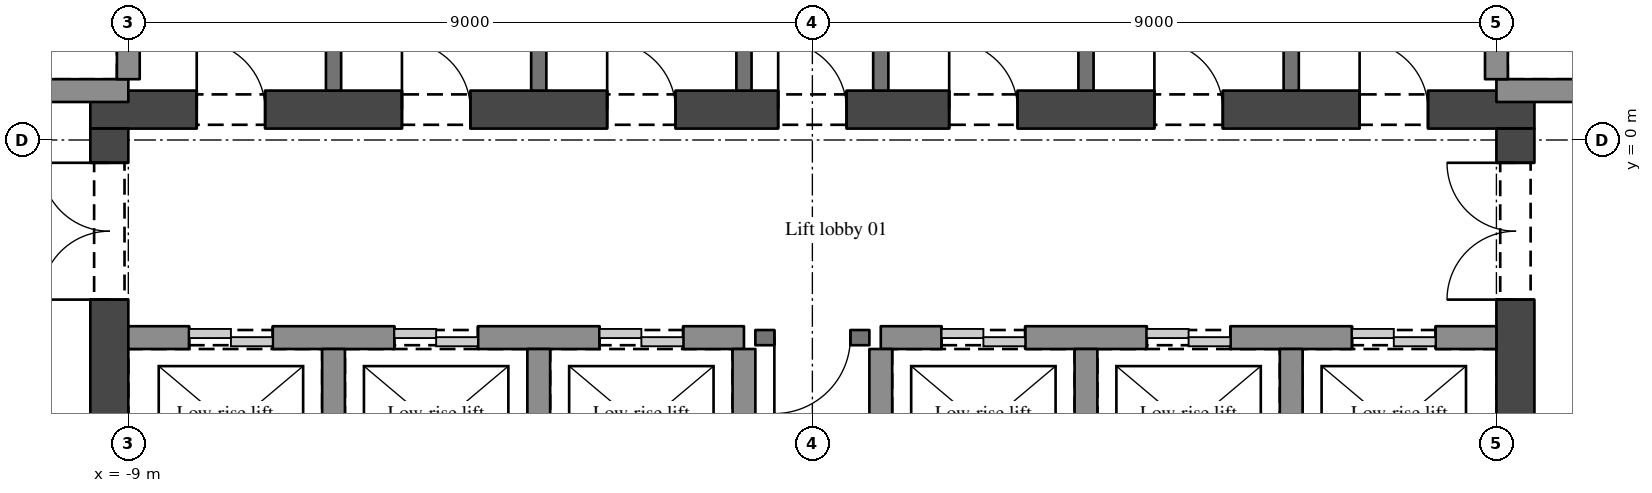
"""IFC4 building model, lengths in metres.
Left out: names, types, materials, properties, quantities, classifications, styles, units other than length and angle.
Written with IfcOpenShell. Run it as: python <this file> out.ifc"""

import sys

from ifc_helpers import new_model, si_unit, direction, frame, frame_2d, origin, place, context, subcontext, project, spatial, rectangle, extrude, element, fill, save


model = new_model("IFC4")
c1 = context("Model", 3, precision=1e-05, world=origin(), true_north=direction((0.0, 1.0)))
c2 = subcontext(c1, "Body", "Model", "MODEL_VIEW")
j1 = project(units=[si_unit("LENGTHUNIT", "METRE"), si_unit("PLANEANGLEUNIT", "RADIAN")], contexts=[c1])
p1 = place(None, origin())
s1 = spatial("IfcSite", under=j1, at=p1, CompositionType="ELEMENT")
p2 = place(p1, origin())
s2 = spatial("IfcBuilding", under=s1, at=p2, CompositionType="ELEMENT")
p3 = place(p2, frame((0.0, 0.0, 62.1)))
s3 = spatial("IfcBuildingStorey", under=s2, at=p3, CompositionType="ELEMENT", Elevation=62.1)
p4 = place(p3, frame((-9.5, 0.4, 0.0), z_axis=(0.0, 0.0, 1.0), x_axis=(1.0, 0.0, 0.0)))
e1 = element("IfcWall", 1, at=p4, inside=s3, PredefinedType="SHEAR", context=c2, shape_type="SweptSolid", body=[
    extrude(rectangle(XDim=19.0, YDim=0.5, at=frame_2d((9.5, 0.0))), origin(), (0.0, 0.0, 1.0), 3.9),
])
p5 = place(p4, frame((1.4, 0.0, 0.0)))
e2 = element("IfcOpeningElement", 2, at=p5, cuts=e1, PredefinedType="OPENING", context=c2, shape_type="SweptSolid", body=[
    extrude(rectangle(XDim=0.9, YDim=2.1, at=frame_2d((0.45, 1.05))), frame((0.0, 0.26, 0.0), z_axis=(0.0, -1.0, 0.0), x_axis=(1.0, 0.0, 0.0)), (0.0, 0.0, 1.0), 0.52),
])
p6 = place(p4, frame((4.1, 0.0, 0.0)))
e3 = element("IfcOpeningElement", 3, at=p6, cuts=e1, PredefinedType="OPENING", context=c2, shape_type="SweptSolid", body=[
    extrude(rectangle(XDim=0.9, YDim=2.1, at=frame_2d((0.45, 1.05))), frame((0.0, 0.26, 0.0), z_axis=(0.0, -1.0, 0.0), x_axis=(1.0, 0.0, 0.0)), (0.0, 0.0, 1.0), 0.52),
])
p7 = place(p4, frame((6.8, 0.0, 0.0)))
e4 = element("IfcOpeningElement", 4, at=p7, cuts=e1, PredefinedType="OPENING", context=c2, shape_type="SweptSolid", body=[
    extrude(rectangle(XDim=0.9, YDim=2.1, at=frame_2d((0.45, 1.05))), frame((0.0, 0.26, 0.0), z_axis=(0.0, -1.0, 0.0), x_axis=(1.0, 0.0, 0.0)), (0.0, 0.0, 1.0), 0.52),
])
p8 = place(p4, frame((11.3, 0.0, 0.0)))
e5 = element("IfcOpeningElement", 5, at=p8, cuts=e1, PredefinedType="OPENING", context=c2, shape_type="SweptSolid", body=[
    extrude(rectangle(XDim=0.9, YDim=2.1, at=frame_2d((0.45, 1.05))), frame((0.0, 0.26, 0.0), z_axis=(0.0, -1.0, 0.0), x_axis=(1.0, 0.0, 0.0)), (0.0, 0.0, 1.0), 0.52),
])
p9 = place(p4, frame((14.0, 0.0, 0.0)))
e6 = element("IfcOpeningElement", 6, at=p9, cuts=e1, PredefinedType="OPENING", context=c2, shape_type="SweptSolid", body=[
    extrude(rectangle(XDim=0.9, YDim=2.1, at=frame_2d((0.45, 1.05))), frame((0.0, 0.26, 0.0), z_axis=(0.0, -1.0, 0.0), x_axis=(1.0, 0.0, 0.0)), (0.0, 0.0, 1.0), 0.52),
])
p10 = place(p4, frame((16.7, 0.0, 0.0)))
e7 = element("IfcOpeningElement", 7, at=p10, cuts=e1, PredefinedType="OPENING", context=c2, shape_type="SweptSolid", body=[
    extrude(rectangle(XDim=0.9, YDim=2.1, at=frame_2d((0.45, 1.05))), frame((0.0, 0.26, 0.0), z_axis=(0.0, -1.0, 0.0), x_axis=(1.0, 0.0, 0.0)), (0.0, 0.0, 1.0), 0.52),
])
p11 = place(p4, frame((9.05, 0.0, 0.0)))
e8 = element("IfcOpeningElement", 8, at=p11, cuts=e1, PredefinedType="OPENING", context=c2, shape_type="SweptSolid", body=[
    extrude(rectangle(XDim=0.9, YDim=2.1, at=frame_2d((0.45, 1.05))), frame((0.0, 0.26, 0.0), z_axis=(0.0, -1.0, 0.0), x_axis=(1.0, 0.0, 0.0)), (0.0, 0.0, 1.0), 0.52),
])
p12 = place(p3, frame((-9.25, -11.5, 0.0), z_axis=(0.0, 0.0, 1.0), x_axis=(0.0, 1.0, 0.0)))
e9 = element("IfcWall", 9, at=p12, inside=s3, PredefinedType="SHEAR", context=c2, shape_type="SweptSolid", body=[
    extrude(rectangle(XDim=11.65, YDim=0.5, at=frame_2d((5.825, 0.0))), origin(), (0.0, 0.0, 1.0), 3.9),
])
p13 = place(p12, frame((9.4, 0.0, 0.0)))
e10 = element("IfcOpeningElement", 10, at=p13, cuts=e9, PredefinedType="OPENING", context=c2, shape_type="SweptSolid", body=[
    extrude(rectangle(XDim=1.8, YDim=2.1, at=frame_2d((0.9, 1.05))), frame((0.0, 0.26, 0.0), z_axis=(0.0, -1.0, 0.0), x_axis=(1.0, 0.0, 0.0)), (0.0, 0.0, 1.0), 0.52),
])
p14 = place(p12, frame((5.25, 0.0, 0.0)))
e11 = element("IfcOpeningElement", 11, at=p14, cuts=e9, PredefinedType="OPENING", context=c2, shape_type="SweptSolid", body=[
    extrude(rectangle(XDim=1.1, YDim=2.1, at=frame_2d((0.55, 1.05))), frame((0.0, 0.26, 0.0), z_axis=(0.0, -1.0, 0.0), x_axis=(1.0, 0.0, 0.0)), (0.0, 0.0, 1.0), 0.52),
])
p15 = place(p3, frame((9.25, -11.5, 0.0), z_axis=(0.0, 0.0, 1.0), x_axis=(0.0, 1.0, 0.0)))
e12 = element("IfcWall", 12, at=p15, inside=s3, PredefinedType="SHEAR", context=c2, shape_type="SweptSolid", body=[
    extrude(rectangle(XDim=11.65, YDim=0.5, at=frame_2d((5.825, 0.0))), origin(), (0.0, 0.0, 1.0), 3.9),
])
p16 = place(p15, frame((9.4, 0.0, 0.0)))
e13 = element("IfcOpeningElement", 13, at=p16, cuts=e12, PredefinedType="OPENING", context=c2, shape_type="SweptSolid", body=[
    extrude(rectangle(XDim=1.8, YDim=2.1, at=frame_2d((0.9, 1.05))), frame((0.0, 0.26, 0.0), z_axis=(0.0, -1.0, 0.0), x_axis=(1.0, 0.0, 0.0)), (0.0, 0.0, 1.0), 0.52),
])
p17 = place(p15, frame((5.25, 0.0, 0.0)))
e14 = element("IfcOpeningElement", 14, at=p17, cuts=e12, PredefinedType="OPENING", context=c2, shape_type="SweptSolid", body=[
    extrude(rectangle(XDim=1.1, YDim=2.1, at=frame_2d((0.55, 1.05))), frame((0.0, 0.26, 0.0), z_axis=(0.0, -1.0, 0.0), x_axis=(1.0, 0.0, 0.0)), (0.0, 0.0, 1.0), 0.52),
])
p18 = place(p3, frame((-9.0, -2.6, 0.0), z_axis=(0.0, 0.0, 1.0), x_axis=(1.0, 0.0, 0.0)))
e15 = element("IfcWall", 15, at=p18, inside=s3, PredefinedType="SHEAR", context=c2, shape_type="SweptSolid", body=[
    extrude(rectangle(XDim=8.1, YDim=0.3, at=frame_2d((4.05, 0.0))), origin(), (0.0, 0.0, 1.0), 3.9),
])
p19 = place(p18, frame((0.8, 0.0, 0.0)))
e16 = element("IfcOpeningElement", 16, at=p19, cuts=e15, PredefinedType="OPENING", context=c2, shape_type="SweptSolid", body=[
    extrude(rectangle(XDim=1.1, YDim=2.1, at=frame_2d((0.55, 1.05))), frame((0.0, 0.16, 0.0), z_axis=(0.0, -1.0, 0.0), x_axis=(1.0, 0.0, 0.0)), (0.0, 0.0, 1.0), 0.32),
])
p20 = place(p18, frame((3.5, 0.0, 0.0)))
e17 = element("IfcOpeningElement", 17, at=p20, cuts=e15, PredefinedType="OPENING", context=c2, shape_type="SweptSolid", body=[
    extrude(rectangle(XDim=1.1, YDim=2.1, at=frame_2d((0.55, 1.05))), frame((0.0, 0.16, 0.0), z_axis=(0.0, -1.0, 0.0), x_axis=(1.0, 0.0, 0.0)), (0.0, 0.0, 1.0), 0.32),
])
p21 = place(p18, frame((6.2, 0.0, 0.0)))
e18 = element("IfcOpeningElement", 18, at=p21, cuts=e15, PredefinedType="OPENING", context=c2, shape_type="SweptSolid", body=[
    extrude(rectangle(XDim=1.1, YDim=2.1, at=frame_2d((0.55, 1.05))), frame((0.0, 0.16, 0.0), z_axis=(0.0, -1.0, 0.0), x_axis=(1.0, 0.0, 0.0)), (0.0, 0.0, 1.0), 0.32),
])
p22 = place(p3, frame((0.75, -2.6, 0.0), z_axis=(0.0, 0.0, 1.0), x_axis=(-1.0, 0.0, 0.0)))
e19 = element("IfcWall", 19, at=p22, inside=s3, PredefinedType="SOLIDWALL", context=c2, shape_type="SweptSolid", body=[
    extrude(rectangle(XDim=1.5, YDim=0.2, at=frame_2d((0.75, 0.0))), origin(), (0.0, 0.0, 1.0), 3.6),
])
p23 = place(p22, frame((0.25, 0.0, 0.0)))
e20 = element("IfcOpeningElement", 20, at=p23, cuts=e19, PredefinedType="OPENING", context=c2, shape_type="SweptSolid", body=[
    extrude(rectangle(XDim=1.0, YDim=2.1, at=frame_2d((0.5, 1.05))), frame((0.0, 0.11, 0.0), z_axis=(0.0, -1.0, 0.0), x_axis=(1.0, 0.0, 0.0)), (0.0, 0.0, 1.0), 0.22),
])
p24 = place(p3, frame((0.9, -2.6, 0.0), z_axis=(0.0, 0.0, 1.0), x_axis=(1.0, 0.0, 0.0)))
e21 = element("IfcWall", 21, at=p24, inside=s3, PredefinedType="SHEAR", context=c2, shape_type="SweptSolid", body=[
    extrude(rectangle(XDim=8.1, YDim=0.3, at=frame_2d((4.05, 0.0))), origin(), (0.0, 0.0, 1.0), 3.9),
])
p25 = place(p24, frame((0.8, 0.0, 0.0)))
e22 = element("IfcOpeningElement", 22, at=p25, cuts=e21, PredefinedType="OPENING", context=c2, shape_type="SweptSolid", body=[
    extrude(rectangle(XDim=1.1, YDim=2.1, at=frame_2d((0.55, 1.05))), frame((0.0, 0.16, 0.0), z_axis=(0.0, -1.0, 0.0), x_axis=(1.0, 0.0, 0.0)), (0.0, 0.0, 1.0), 0.32),
])
p26 = place(p24, frame((3.5, 0.0, 0.0)))
e23 = element("IfcOpeningElement", 23, at=p26, cuts=e21, PredefinedType="OPENING", context=c2, shape_type="SweptSolid", body=[
    extrude(rectangle(XDim=1.1, YDim=2.1, at=frame_2d((0.55, 1.05))), frame((0.0, 0.16, 0.0), z_axis=(0.0, -1.0, 0.0), x_axis=(1.0, 0.0, 0.0)), (0.0, 0.0, 1.0), 0.32),
])
p27 = place(p24, frame((6.2, 0.0, 0.0)))
e24 = element("IfcOpeningElement", 24, at=p27, cuts=e21, PredefinedType="OPENING", context=c2, shape_type="SweptSolid", body=[
    extrude(rectangle(XDim=1.1, YDim=2.1, at=frame_2d((0.55, 1.05))), frame((0.0, 0.16, 0.0), z_axis=(0.0, -1.0, 0.0), x_axis=(1.0, 0.0, 0.0)), (0.0, 0.0, 1.0), 0.32),
])
for number, where, z_axis, x_axis in (
    (25, (-9.0, 0.65, 0.0), (0.0, 0.0, 1.0), (-1.0, 0.0, 0.0)),
    (26, (12.25, 0.65, 0.0), (0.0, 0.0, 1.0), (-1.0, 0.0, 0.0)),
):
    element("IfcWall", number, at=place(p3, frame(where, z_axis=z_axis, x_axis=x_axis)), inside=s3, PredefinedType="SHEAR", context=c2, shape_type="SweptSolid", body=[
        extrude(rectangle(XDim=3.25, YDim=0.3, at=frame_2d((1.625, 0.0))), origin(), (0.0, 0.0, 1.0), 3.9),
    ])
p28 = place(p3, frame((-9.0, 0.8, 0.0), z_axis=(0.0, 0.0, 1.0), x_axis=(0.0, 1.0, 0.0)))
e27 = element("IfcWall", 27, at=p28, inside=s3, PredefinedType="SHEAR", context=c2, shape_type="SweptSolid", body=[
    extrude(rectangle(XDim=2.35, YDim=0.3, at=frame_2d((1.175, 0.0))), origin(), (0.0, 0.0, 1.0), 3.9),
])
p29 = place(p3, frame((-6.3, -4.8, 0.0), z_axis=(0.0, 0.0, 1.0), x_axis=(0.0, 1.0, 0.0)))
e28 = element("IfcWall", 28, at=p29, inside=s3, PredefinedType="SHEAR", context=c2, shape_type="SweptSolid", body=[
    extrude(rectangle(XDim=2.05, YDim=0.3, at=frame_2d((1.025, 0.0))), origin(), (0.0, 0.0, 1.0), 3.9),
])
p30 = place(p3, frame((-6.3, 0.65, 0.0), z_axis=(0.0, 0.0, 1.0), x_axis=(0.0, 1.0, 0.0)))
e29 = element("IfcWall", 29, at=p30, inside=s3, PredefinedType="SOLIDWALL", context=c2, shape_type="SweptSolid", body=[
    extrude(rectangle(XDim=2.5, YDim=0.2, at=frame_2d((1.25, 0.0))), origin(), (0.0, 0.0, 1.0), 3.6),
])
p31 = place(p3, frame((-3.6, -4.8, 0.0), z_axis=(0.0, 0.0, 1.0), x_axis=(0.0, 1.0, 0.0)))
e30 = element("IfcWall", 30, at=p31, inside=s3, PredefinedType="SHEAR", context=c2, shape_type="SweptSolid", body=[
    extrude(rectangle(XDim=2.05, YDim=0.3, at=frame_2d((1.025, 0.0))), origin(), (0.0, 0.0, 1.0), 3.9),
])
p32 = place(p3, frame((-3.6, 0.65, 0.0), z_axis=(0.0, 0.0, 1.0), x_axis=(0.0, 1.0, 0.0)))
e31 = element("IfcWall", 31, at=p32, inside=s3, PredefinedType="SOLIDWALL", context=c2, shape_type="SweptSolid", body=[
    extrude(rectangle(XDim=2.5, YDim=0.2, at=frame_2d((1.25, 0.0))), origin(), (0.0, 0.0, 1.0), 3.6),
])
p33 = place(p3, frame((-0.9, -4.8, 0.0), z_axis=(0.0, 0.0, 1.0), x_axis=(0.0, 1.0, 0.0)))
e32 = element("IfcWall", 32, at=p33, inside=s3, PredefinedType="SHEAR", context=c2, shape_type="SweptSolid", body=[
    extrude(rectangle(XDim=2.05, YDim=0.3, at=frame_2d((1.025, 0.0))), origin(), (0.0, 0.0, 1.0), 3.9),
])
p34 = place(p3, frame((-0.9, 0.65, 0.0), z_axis=(0.0, 0.0, 1.0), x_axis=(0.0, 1.0, 0.0)))
e33 = element("IfcWall", 33, at=p34, inside=s3, PredefinedType="SOLIDWALL", context=c2, shape_type="SweptSolid", body=[
    extrude(rectangle(XDim=2.5, YDim=0.2, at=frame_2d((1.25, 0.0))), origin(), (0.0, 0.0, 1.0), 3.6),
])
p35 = place(p3, frame((0.9, -4.8, 0.0), z_axis=(0.0, 0.0, 1.0), x_axis=(0.0, 1.0, 0.0)))
e34 = element("IfcWall", 34, at=p35, inside=s3, PredefinedType="SHEAR", context=c2, shape_type="SweptSolid", body=[
    extrude(rectangle(XDim=2.05, YDim=0.3, at=frame_2d((1.025, 0.0))), origin(), (0.0, 0.0, 1.0), 3.9),
])
p36 = place(p3, frame((0.9, 0.65, 0.0), z_axis=(0.0, 0.0, 1.0), x_axis=(0.0, 1.0, 0.0)))
e35 = element("IfcWall", 35, at=p36, inside=s3, PredefinedType="SOLIDWALL", context=c2, shape_type="SweptSolid", body=[
    extrude(rectangle(XDim=2.5, YDim=0.2, at=frame_2d((1.25, 0.0))), origin(), (0.0, 0.0, 1.0), 3.6),
])
p37 = place(p3, frame((3.6, -4.8, 0.0), z_axis=(0.0, 0.0, 1.0), x_axis=(0.0, 1.0, 0.0)))
e36 = element("IfcWall", 36, at=p37, inside=s3, PredefinedType="SHEAR", context=c2, shape_type="SweptSolid", body=[
    extrude(rectangle(XDim=2.05, YDim=0.3, at=frame_2d((1.025, 0.0))), origin(), (0.0, 0.0, 1.0), 3.9),
])
p38 = place(p3, frame((3.6, 0.65, 0.0), z_axis=(0.0, 0.0, 1.0), x_axis=(0.0, 1.0, 0.0)))
e37 = element("IfcWall", 37, at=p38, inside=s3, PredefinedType="SOLIDWALL", context=c2, shape_type="SweptSolid", body=[
    extrude(rectangle(XDim=2.5, YDim=0.2, at=frame_2d((1.25, 0.0))), origin(), (0.0, 0.0, 1.0), 3.6),
])
p39 = place(p3, frame((6.3, -4.8, 0.0), z_axis=(0.0, 0.0, 1.0), x_axis=(0.0, 1.0, 0.0)))
e38 = element("IfcWall", 38, at=p39, inside=s3, PredefinedType="SHEAR", context=c2, shape_type="SweptSolid", body=[
    extrude(rectangle(XDim=2.05, YDim=0.3, at=frame_2d((1.025, 0.0))), origin(), (0.0, 0.0, 1.0), 3.9),
])
p40 = place(p3, frame((6.3, 0.65, 0.0), z_axis=(0.0, 0.0, 1.0), x_axis=(0.0, 1.0, 0.0)))
e39 = element("IfcWall", 39, at=p40, inside=s3, PredefinedType="SOLIDWALL", context=c2, shape_type="SweptSolid", body=[
    extrude(rectangle(XDim=2.5, YDim=0.2, at=frame_2d((1.25, 0.0))), origin(), (0.0, 0.0, 1.0), 3.6),
])
p41 = place(p3, frame((9.0, 0.8, 0.0), z_axis=(0.0, 0.0, 1.0), x_axis=(0.0, 1.0, 0.0)))
e40 = element("IfcWall", 40, at=p41, inside=s3, PredefinedType="SHEAR", context=c2, shape_type="SweptSolid", body=[
    extrude(rectangle(XDim=2.35, YDim=0.3, at=frame_2d((1.175, 0.0))), origin(), (0.0, 0.0, 1.0), 3.9),
])
p42 = place(p16, origin())
e41 = element("IfcDoor", 41, at=p42, inside=s3, OperationType="DOUBLE_DOOR_SINGLE_SWING", PredefinedType="DOOR", context=c2, shape_type="SweptSolid", body=[
    extrude(rectangle(XDim=1.8, YDim=2.1, at=frame_2d((0.9, 1.05))), frame((0.0, 0.025, 0.0), z_axis=(0.0, -1.0, 0.0), x_axis=(1.0, 0.0, 0.0)), (0.0, 0.0, 1.0), 0.05),
])
fill(e13, e41)
p43 = place(p13, origin())
e42 = element("IfcDoor", 42, at=p43, inside=s3, OperationType="DOUBLE_DOOR_SINGLE_SWING", PredefinedType="DOOR", context=c2, shape_type="SweptSolid", body=[
    extrude(rectangle(XDim=1.8, YDim=2.1, at=frame_2d((0.9, 1.05))), frame((0.0, 0.025, 0.0), z_axis=(0.0, -1.0, 0.0), x_axis=(1.0, 0.0, 0.0)), (0.0, 0.0, 1.0), 0.05),
])
fill(e10, e42)
p44 = place(p23, origin())
e43 = element("IfcDoor", 43, at=p44, inside=s3, OperationType="SINGLE_SWING_RIGHT", PredefinedType="DOOR", context=c2, shape_type="SweptSolid", body=[
    extrude(rectangle(XDim=1.0, YDim=2.1, at=frame_2d((0.5, 1.05))), frame((0.0, 0.025, 0.0), z_axis=(0.0, -1.0, 0.0), x_axis=(1.0, 0.0, 0.0)), (0.0, 0.0, 1.0), 0.05),
])
fill(e20, e43)
p45 = place(p5, origin())
e44 = element("IfcDoor", 44, at=p45, inside=s3, OperationType="SINGLE_SWING_LEFT", PredefinedType="DOOR", context=c2, shape_type="SweptSolid", body=[
    extrude(rectangle(XDim=0.9, YDim=2.1, at=frame_2d((0.45, 1.05))), frame((0.0, 0.025, 0.0), z_axis=(0.0, -1.0, 0.0), x_axis=(1.0, 0.0, 0.0)), (0.0, 0.0, 1.0), 0.05),
])
fill(e2, e44)
p46 = place(p6, origin())
e45 = element("IfcDoor", 45, at=p46, inside=s3, OperationType="SINGLE_SWING_LEFT", PredefinedType="DOOR", context=c2, shape_type="SweptSolid", body=[
    extrude(rectangle(XDim=0.9, YDim=2.1, at=frame_2d((0.45, 1.05))), frame((0.0, 0.025, 0.0), z_axis=(0.0, -1.0, 0.0), x_axis=(1.0, 0.0, 0.0)), (0.0, 0.0, 1.0), 0.05),
])
fill(e3, e45)
p47 = place(p7, origin())
e46 = element("IfcDoor", 46, at=p47, inside=s3, OperationType="SINGLE_SWING_LEFT", PredefinedType="DOOR", context=c2, shape_type="SweptSolid", body=[
    extrude(rectangle(XDim=0.9, YDim=2.1, at=frame_2d((0.45, 1.05))), frame((0.0, 0.025, 0.0), z_axis=(0.0, -1.0, 0.0), x_axis=(1.0, 0.0, 0.0)), (0.0, 0.0, 1.0), 0.05),
])
fill(e4, e46)
p48 = place(p8, origin())
e47 = element("IfcDoor", 47, at=p48, inside=s3, OperationType="SINGLE_SWING_LEFT", PredefinedType="DOOR", context=c2, shape_type="SweptSolid", body=[
    extrude(rectangle(XDim=0.9, YDim=2.1, at=frame_2d((0.45, 1.05))), frame((0.0, 0.025, 0.0), z_axis=(0.0, -1.0, 0.0), x_axis=(1.0, 0.0, 0.0)), (0.0, 0.0, 1.0), 0.05),
])
fill(e5, e47)
p49 = place(p9, origin())
e48 = element("IfcDoor", 48, at=p49, inside=s3, OperationType="SINGLE_SWING_LEFT", PredefinedType="DOOR", context=c2, shape_type="SweptSolid", body=[
    extrude(rectangle(XDim=0.9, YDim=2.1, at=frame_2d((0.45, 1.05))), frame((0.0, 0.025, 0.0), z_axis=(0.0, -1.0, 0.0), x_axis=(1.0, 0.0, 0.0)), (0.0, 0.0, 1.0), 0.05),
])
fill(e6, e48)
p50 = place(p10, origin())
e49 = element("IfcDoor", 49, at=p50, inside=s3, OperationType="SINGLE_SWING_LEFT", PredefinedType="DOOR", context=c2, shape_type="SweptSolid", body=[
    extrude(rectangle(XDim=0.9, YDim=2.1, at=frame_2d((0.45, 1.05))), frame((0.0, 0.025, 0.0), z_axis=(0.0, -1.0, 0.0), x_axis=(1.0, 0.0, 0.0)), (0.0, 0.0, 1.0), 0.05),
])
fill(e7, e49)
p51 = place(p11, origin())
e50 = element("IfcDoor", 50, at=p51, inside=s3, OperationType="SINGLE_SWING_LEFT", PredefinedType="DOOR", context=c2, shape_type="SweptSolid", body=[
    extrude(rectangle(XDim=0.9, YDim=2.1, at=frame_2d((0.45, 1.05))), frame((0.0, 0.025, 0.0), z_axis=(0.0, -1.0, 0.0), x_axis=(1.0, 0.0, 0.0)), (0.0, 0.0, 1.0), 0.05),
])
fill(e8, e50)
p52 = place(p19, origin())
e51 = element("IfcDoor", 51, at=p52, inside=s3, OperationType="DOUBLE_DOOR_SLIDING", PredefinedType="DOOR", context=c2, shape_type="SweptSolid", body=[
    extrude(rectangle(XDim=1.1, YDim=2.1, at=frame_2d((0.55, 1.05))), frame((0.0, 0.025, 0.0), z_axis=(0.0, -1.0, 0.0), x_axis=(1.0, 0.0, 0.0)), (0.0, 0.0, 1.0), 0.05),
])
fill(e16, e51)
p53 = place(p20, origin())
e52 = element("IfcDoor", 52, at=p53, inside=s3, OperationType="DOUBLE_DOOR_SLIDING", PredefinedType="DOOR", context=c2, shape_type="SweptSolid", body=[
    extrude(rectangle(XDim=1.1, YDim=2.1, at=frame_2d((0.55, 1.05))), frame((0.0, 0.025, 0.0), z_axis=(0.0, -1.0, 0.0), x_axis=(1.0, 0.0, 0.0)), (0.0, 0.0, 1.0), 0.05),
])
fill(e17, e52)
p54 = place(p21, origin())
e53 = element("IfcDoor", 53, at=p54, inside=s3, OperationType="DOUBLE_DOOR_SLIDING", PredefinedType="DOOR", context=c2, shape_type="SweptSolid", body=[
    extrude(rectangle(XDim=1.1, YDim=2.1, at=frame_2d((0.55, 1.05))), frame((0.0, 0.025, 0.0), z_axis=(0.0, -1.0, 0.0), x_axis=(1.0, 0.0, 0.0)), (0.0, 0.0, 1.0), 0.05),
])
fill(e18, e53)
p55 = place(p25, origin())
e54 = element("IfcDoor", 54, at=p55, inside=s3, OperationType="DOUBLE_DOOR_SLIDING", PredefinedType="DOOR", context=c2, shape_type="SweptSolid", body=[
    extrude(rectangle(XDim=1.1, YDim=2.1, at=frame_2d((0.55, 1.05))), frame((0.0, 0.025, 0.0), z_axis=(0.0, -1.0, 0.0), x_axis=(1.0, 0.0, 0.0)), (0.0, 0.0, 1.0), 0.05),
])
fill(e22, e54)
p56 = place(p26, origin())
e55 = element("IfcDoor", 55, at=p56, inside=s3, OperationType="DOUBLE_DOOR_SLIDING", PredefinedType="DOOR", context=c2, shape_type="SweptSolid", body=[
    extrude(rectangle(XDim=1.1, YDim=2.1, at=frame_2d((0.55, 1.05))), frame((0.0, 0.025, 0.0), z_axis=(0.0, -1.0, 0.0), x_axis=(1.0, 0.0, 0.0)), (0.0, 0.0, 1.0), 0.05),
])
fill(e23, e55)
p57 = place(p27, origin())
e56 = element("IfcDoor", 56, at=p57, inside=s3, OperationType="DOUBLE_DOOR_SLIDING", PredefinedType="DOOR", context=c2, shape_type="SweptSolid", body=[
    extrude(rectangle(XDim=1.1, YDim=2.1, at=frame_2d((0.55, 1.05))), frame((0.0, 0.025, 0.0), z_axis=(0.0, -1.0, 0.0), x_axis=(1.0, 0.0, 0.0)), (0.0, 0.0, 1.0), 0.05),
])
fill(e24, e56)
save(model, sys.argv[1])
